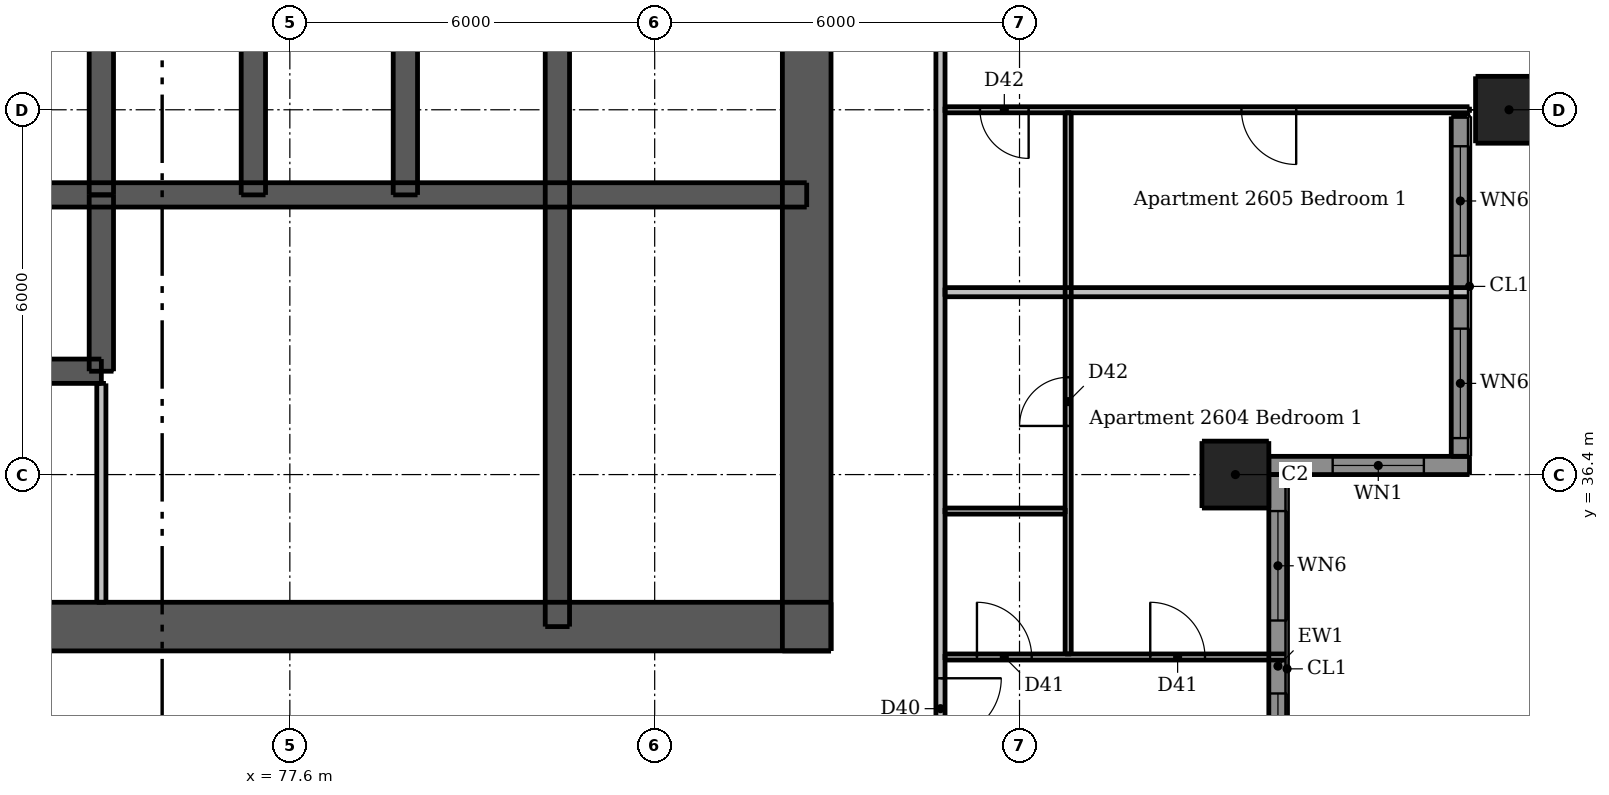
"""IFC4 building model, lengths in metres.
Left out: names, types, materials, properties, quantities, classifications, styles, units other than length and angle.
Written with IfcOpenShell. Run it as: python <this file> out.ifc"""

import sys

from ifc_helpers import new_model, si_unit, direction, frame, frame_2d, origin, origin_2d, place, context, subcontext, project, spatial, rectangle, extrude, element, fill, save


model = new_model("IFC4")
c1 = context("Model", 3, precision=1e-05, world=origin(), true_north=direction((0.0, 1.0)))
c2 = subcontext(c1, "Body", "Model", "MODEL_VIEW")
j1 = project(units=[si_unit("LENGTHUNIT", "METRE"), si_unit("PLANEANGLEUNIT", "RADIAN")], contexts=[c1])
p1 = place(None, origin())
s1 = spatial("IfcSite", under=j1, at=p1, CompositionType="ELEMENT")
p2 = place(p1, origin())
s2 = spatial("IfcBuilding", under=s1, at=p2, CompositionType="ELEMENT")
p3 = place(p2, frame((0.0, 0.0, 98.5)))
s3 = spatial("IfcBuildingStorey", under=s2, at=p3, CompositionType="ELEMENT", Elevation=98.5)
p4 = place(p3, frame((62.5, 33.9, 0.0), z_axis=(0.0, 0.0, 1.0), x_axis=(1.0, 0.0, 0.0)))
e1 = element("IfcWall", 1, at=p4, inside=s3, PredefinedType="SHEAR", context=c2, shape_type="SweptSolid", body=[
    extrude(rectangle(XDim=24.0, YDim=0.8, at=frame_2d((12.0, 0.0))), origin(), (0.0, 0.0, 1.0), 3.05),
])
p5 = place(p4, frame((2.0, 0.0, 0.0)))
e2 = element("IfcOpeningElement", 2, at=p5, cuts=e1, PredefinedType="OPENING", context=c2, shape_type="SweptSolid", body=[
    extrude(rectangle(XDim=1.1, YDim=2.1, at=frame_2d((0.55, 1.05))), frame((0.0, 0.41, 0.0), z_axis=(0.0, -1.0, 0.0), x_axis=(1.0, 0.0, 0.0)), (0.0, 0.0, 1.0), 0.82),
])
p6 = place(p4, frame((20.9, 0.0, 0.0)))
e3 = element("IfcOpeningElement", 3, at=p6, cuts=e1, PredefinedType="OPENING", context=c2, shape_type="SweptSolid", body=[
    extrude(rectangle(XDim=1.1, YDim=2.1, at=frame_2d((0.55, 1.05))), frame((0.0, 0.41, 0.0), z_axis=(0.0, -1.0, 0.0), x_axis=(1.0, 0.0, 0.0)), (0.0, 0.0, 1.0), 0.82),
])
p7 = place(p4, frame((8.0, 0.0, 0.0)))
e4 = element("IfcOpeningElement", 4, at=p7, cuts=e1, PredefinedType="OPENING", context=c2, shape_type="SweptSolid", body=[
    extrude(rectangle(XDim=1.1, YDim=2.1, at=frame_2d((0.55, 1.05))), frame((0.0, 0.41, 0.0), z_axis=(0.0, -1.0, 0.0), x_axis=(1.0, 0.0, 0.0)), (0.0, 0.0, 1.0), 0.82),
])
p8 = place(p4, frame((15.3, 0.0, 0.0)))
e5 = element("IfcOpeningElement", 5, at=p8, cuts=e1, PredefinedType="OPENING", context=c2, shape_type="SweptSolid", body=[
    extrude(rectangle(XDim=0.9, YDim=2.1, at=frame_2d((0.45, 1.05))), frame((0.0, 0.41, 0.0), z_axis=(0.0, -1.0, 0.0), x_axis=(1.0, 0.0, 0.0)), (0.0, 0.0, 1.0), 0.82),
])
p9 = place(p3, frame((86.1, 33.5, 0.0), z_axis=(0.0, 0.0, 1.0), x_axis=(0.0, 1.0, 0.0)))
e6 = element("IfcWall", 6, at=p9, inside=s3, PredefinedType="SHEAR", context=c2, shape_type="SweptSolid", body=[
    extrude(rectangle(XDim=24.0, YDim=0.8, at=frame_2d((12.0, 0.0))), origin(), (0.0, 0.0, 1.0), 3.05),
])
p10 = place(p9, frame((11.2, 0.0, 0.0)))
e7 = element("IfcOpeningElement", 7, at=p10, cuts=e6, PredefinedType="OPENING", context=c2, shape_type="SweptSolid", body=[
    extrude(rectangle(XDim=1.6, YDim=2.1, at=frame_2d((0.8, 1.05))), frame((0.0, 0.41, 0.0), z_axis=(0.0, -1.0, 0.0), x_axis=(1.0, 0.0, 0.0)), (0.0, 0.0, 1.0), 0.82),
])
p11 = place(p3, frame((62.9, 41.0, 0.0), z_axis=(0.0, 0.0, 1.0), x_axis=(1.0, 0.0, 0.0)))
e8 = element("IfcWall", 8, at=p11, inside=s3, PredefinedType="SHEAR", context=c2, shape_type="SweptSolid", body=[
    extrude(rectangle(XDim=23.2, YDim=0.4, at=frame_2d((11.6, 0.0))), origin(), (0.0, 0.0, 1.0), 3.05),
])
p12 = place(p3, frame((82.0, 33.9, 0.0), z_axis=(0.0, 0.0, 1.0), x_axis=(0.0, 1.0, 0.0)))
e9 = element("IfcWall", 9, at=p12, inside=s3, PredefinedType="SHEAR", context=c2, shape_type="SweptSolid", body=[
    extrude(rectangle(XDim=10.0, YDim=0.4, at=frame_2d((5.0, 0.0))), origin(), (0.0, 0.0, 1.0), 3.05),
])
for number, where, z_axis, x_axis in (
    (10, (74.5, 41.0, 0.0), (0.0, 0.0, 1.0), (0.0, 1.0, 0.0)),
    (11, (77.0, 41.0, 0.0), (0.0, 0.0, 1.0), (0.0, 1.0, 0.0)),
    (12, (79.5, 41.0, 0.0), (0.0, 0.0, 1.0), (0.0, 1.0, 0.0)),
):
    element("IfcWall", number, at=place(p3, frame(where, z_axis=z_axis, x_axis=x_axis)), inside=s3, PredefinedType="SHEAR", context=c2, shape_type="SweptSolid", body=[
        extrude(rectangle(XDim=2.9, YDim=0.4, at=frame_2d((1.45, 0.0))), origin(), (0.0, 0.0, 1.0), 3.05),
    ])
p13 = place(p3, frame((67.0, 38.1, 0.0), z_axis=(0.0, 0.0, 1.0), x_axis=(1.0, 0.0, 0.0)))
e13 = element("IfcWall", 13, at=p13, inside=s3, PredefinedType="SHEAR", context=c2, shape_type="SweptSolid", body=[
    extrude(rectangle(XDim=7.5, YDim=0.4, at=frame_2d((3.75, 0.0))), origin(), (0.0, 0.0, 1.0), 3.05),
])
p14 = place(p13, frame((0.7, 0.0, 0.0)))
e14 = element("IfcOpeningElement", 14, at=p14, cuts=e13, PredefinedType="OPENING", context=c2, shape_type="SweptSolid", body=[
    extrude(rectangle(XDim=1.1, YDim=2.1, at=frame_2d((0.55, 1.05))), frame((0.0, 0.21, 0.0), z_axis=(0.0, -1.0, 0.0), x_axis=(1.0, 0.0, 0.0)), (0.0, 0.0, 1.0), 0.42),
])
p15 = place(p13, frame((3.2, 0.0, 0.0)))
e15 = element("IfcOpeningElement", 15, at=p15, cuts=e13, PredefinedType="OPENING", context=c2, shape_type="SweptSolid", body=[
    extrude(rectangle(XDim=1.1, YDim=2.1, at=frame_2d((0.55, 1.05))), frame((0.0, 0.21, 0.0), z_axis=(0.0, -1.0, 0.0), x_axis=(1.0, 0.0, 0.0)), (0.0, 0.0, 1.0), 0.42),
])
p16 = place(p13, frame((5.65, 0.0, 0.0)))
e16 = element("IfcOpeningElement", 16, at=p16, cuts=e13, PredefinedType="OPENING", context=c2, shape_type="SweptSolid", body=[
    extrude(rectangle(XDim=1.2, YDim=2.1, at=frame_2d((0.6, 1.05))), frame((0.0, 0.21, 0.0), z_axis=(0.0, -1.0, 0.0), x_axis=(1.0, 0.0, 0.0)), (0.0, 0.0, 1.0), 0.42),
])
p17 = place(p3, frame((74.5, 38.1, 0.0), z_axis=(0.0, 0.0, 1.0), x_axis=(0.0, 1.0, 0.0)))
e17 = element("IfcWall", 17, at=p17, inside=s3, PredefinedType="SHEAR", context=c2, shape_type="SweptSolid", body=[
    extrude(rectangle(XDim=2.9, YDim=0.4, at=frame_2d((1.45, 0.0))), origin(), (0.0, 0.0, 1.0), 3.05),
])
for number, where, z_axis, x_axis in (
    (18, (93.15, 36.4, 0.0), (0.0, 0.0, 1.0), (1.0, 0.0, 0.0)),
    (19, (97.65, 42.4, 0.0), (0.0, 0.0, 1.0), (1.0, 0.0, 0.0)),
):
    element("IfcColumn", number, at=place(p3, frame(where, z_axis=z_axis, x_axis=x_axis)), inside=s3, PredefinedType="COLUMN", context=c2, shape_type="SweptSolid", body=[
        extrude(rectangle(XDim=1.1, YDim=1.1, at=origin_2d()), origin(), (0.0, 0.0, 1.0), 3.05),
    ])
p18 = place(p3, frame((93.7, 36.55, 0.0), z_axis=(0.0, 0.0, 1.0), x_axis=(1.0, 0.0, 0.0)))
e20 = element("IfcWall", 20, at=p18, inside=s3, PredefinedType="SOLIDWALL", context=c2, shape_type="SweptSolid", body=[
    extrude(rectangle(XDim=3.3, YDim=0.3, at=frame_2d((1.65, 0.0))), origin(), (0.0, 0.0, 1.0), 3.05),
])
p19 = place(p18, frame((1.05, 0.0, 0.9)))
e21 = element("IfcOpeningElement", 21, at=p19, cuts=e20, PredefinedType="OPENING", context=c2, shape_type="SweptSolid", body=[
    extrude(rectangle(XDim=1.5, YDim=1.5, at=frame_2d((0.75, 0.75))), frame((0.0, 0.16, 0.0), z_axis=(0.0, -1.0, 0.0), x_axis=(1.0, 0.0, 0.0)), (0.0, 0.0, 1.0), 0.32),
])
p20 = place(p3, frame((93.85, 30.1, 0.0), z_axis=(0.0, 0.0, 1.0), x_axis=(0.0, 1.0, 0.0)))
e22 = element("IfcWall", 22, at=p20, inside=s3, PredefinedType="SOLIDWALL", context=c2, shape_type="SweptSolid", body=[
    extrude(rectangle(XDim=6.3, YDim=0.3, at=frame_2d((3.15, 0.0))), origin(), (0.0, 0.0, 1.0), 3.05),
])
p21 = place(p20, frame((0.9, 0.0, 0.15)))
e23 = element("IfcOpeningElement", 23, at=p21, cuts=e22, PredefinedType="OPENING", context=c2, shape_type="SweptSolid", body=[
    extrude(rectangle(XDim=1.8, YDim=2.1, at=frame_2d((0.9, 1.05))), frame((0.0, 0.16, 0.0), z_axis=(0.0, -1.0, 0.0), x_axis=(1.0, 0.0, 0.0)), (0.0, 0.0, 1.0), 0.32),
])
p22 = place(p20, frame((3.9, 0.0, 0.15)))
e24 = element("IfcOpeningElement", 24, at=p22, cuts=e22, PredefinedType="OPENING", context=c2, shape_type="SweptSolid", body=[
    extrude(rectangle(XDim=1.8, YDim=2.1, at=frame_2d((0.9, 1.05))), frame((0.0, 0.16, 0.0), z_axis=(0.0, -1.0, 0.0), x_axis=(1.0, 0.0, 0.0)), (0.0, 0.0, 1.0), 0.32),
])
p23 = place(p3, frame((96.85, 36.7, 0.0), z_axis=(0.0, 0.0, 1.0), x_axis=(0.0, 1.0, 0.0)))
e25 = element("IfcWall", 25, at=p23, inside=s3, PredefinedType="SOLIDWALL", context=c2, shape_type="SweptSolid", body=[
    extrude(rectangle(XDim=5.59, YDim=0.3, at=frame_2d((2.795, 0.0))), origin(), (0.0, 0.0, 1.0), 3.05),
])
p24 = place(p23, frame((0.3, 0.0, 0.15)))
e26 = element("IfcOpeningElement", 26, at=p24, cuts=e25, PredefinedType="OPENING", context=c2, shape_type="SweptSolid", body=[
    extrude(rectangle(XDim=1.8, YDim=2.1, at=frame_2d((0.9, 1.05))), frame((0.0, 0.16, 0.0), z_axis=(0.0, -1.0, 0.0), x_axis=(1.0, 0.0, 0.0)), (0.0, 0.0, 1.0), 0.32),
])
p25 = place(p23, frame((3.3, 0.0, 0.15)))
e27 = element("IfcOpeningElement", 27, at=p25, cuts=e25, PredefinedType="OPENING", context=c2, shape_type="SweptSolid", body=[
    extrude(rectangle(XDim=1.8, YDim=2.1, at=frame_2d((0.9, 1.05))), frame((0.0, 0.16, 0.0), z_axis=(0.0, -1.0, 0.0), x_axis=(1.0, 0.0, 0.0)), (0.0, 0.0, 1.0), 0.32),
])
p26 = place(p3, frame((74.5, 34.3, 0.0), z_axis=(0.0, 0.0, 1.0), x_axis=(0.0, 1.0, 0.0)))
e28 = element("IfcWall", 28, at=p26, inside=s3, PredefinedType="PLUMBINGWALL", context=c2, shape_type="SweptSolid", body=[
    extrude(rectangle(XDim=3.6, YDim=0.15, at=frame_2d((1.8, 0.0))), origin(), (0.0, 0.0, 1.0), 3.05),
])
p27 = place(p3, frame((90.4, 33.45, 0.0), z_axis=(0.0, 0.0, 1.0), x_axis=(0.0, 1.0, 0.0)))
e29 = element("IfcWall", 29, at=p27, inside=s3, PredefinedType="PARTITIONING", context=c2, shape_type="SweptSolid", body=[
    extrude(rectangle(XDim=8.9, YDim=0.1, at=frame_2d((4.45, 0.0))), origin(), (0.0, 0.0, 1.0), 3.05),
])
p28 = place(p27, frame((3.75, 0.0, 0.0)))
e30 = element("IfcOpeningElement", 30, at=p28, cuts=e29, PredefinedType="OPENING", context=c2, shape_type="SweptSolid", body=[
    extrude(rectangle(XDim=0.8, YDim=2.1, at=frame_2d((0.4, 1.05))), frame((0.0, 0.06, 0.0), z_axis=(0.0, -1.0, 0.0), x_axis=(1.0, 0.0, 0.0)), (0.0, 0.0, 1.0), 0.12),
])
p29 = place(p3, frame((97.0, 42.4, 0.0), z_axis=(0.0, 0.0, 1.0), x_axis=(-1.0, 0.0, 0.0)))
e31 = element("IfcWall", 31, at=p29, inside=s3, PredefinedType="PARTITIONING", context=c2, shape_type="SweptSolid", body=[
    extrude(rectangle(XDim=8.625, YDim=0.1, at=frame_2d((4.312, 0.0))), origin(), (0.0, 0.0, 1.0), 2.516),
])
p30 = place(p29, frame((2.85, 0.0, 0.0)))
e32 = element("IfcOpeningElement", 32, at=p30, cuts=e31, PredefinedType="OPENING", context=c2, shape_type="SweptSolid", body=[
    extrude(rectangle(XDim=0.9, YDim=2.1, at=frame_2d((0.45, 1.05))), frame((0.0, 0.06, 0.0), z_axis=(0.0, -1.0, 0.0), x_axis=(1.0, 0.0, 0.0)), (0.0, 0.0, 1.0), 0.12),
])
p31 = place(p29, frame((7.25, 0.0, 0.0)))
e33 = element("IfcOpeningElement", 33, at=p31, cuts=e31, PredefinedType="OPENING", context=c2, shape_type="SweptSolid", body=[
    extrude(rectangle(XDim=0.8, YDim=2.1, at=frame_2d((0.4, 1.05))), frame((0.0, 0.06, 0.0), z_axis=(0.0, -1.0, 0.0), x_axis=(1.0, 0.0, 0.0)), (0.0, 0.0, 1.0), 0.12),
])
p32 = place(p3, frame((88.375, 35.8, 0.0), z_axis=(0.0, 0.0, 1.0), x_axis=(1.0, 0.0, 0.0)))
e34 = element("IfcWall", 34, at=p32, inside=s3, PredefinedType="PARTITIONING", context=c2, shape_type="SweptSolid", body=[
    extrude(rectangle(XDim=1.975, YDim=0.1, at=frame_2d((0.988, 0.0))), origin(), (0.0, 0.0, 1.0), 3.05),
])
p33 = place(p3, frame((88.375, 33.4, 0.0), z_axis=(0.0, 0.0, 1.0), x_axis=(1.0, 0.0, 0.0)))
e35 = element("IfcWall", 35, at=p33, inside=s3, PredefinedType="PARTITIONING", context=c2, shape_type="SweptSolid", body=[
    extrude(rectangle(XDim=5.625, YDim=0.1, at=frame_2d((2.812, 0.0))), origin(), (0.0, 0.0, 1.0), 3.05),
])
p34 = place(p33, frame((0.525, 0.0, 0.0)))
e36 = element("IfcOpeningElement", 36, at=p34, cuts=e35, PredefinedType="OPENING", context=c2, shape_type="SweptSolid", body=[
    extrude(rectangle(XDim=0.9, YDim=2.1, at=frame_2d((0.45, 1.05))), frame((0.0, 0.06, 0.0), z_axis=(0.0, -1.0, 0.0), x_axis=(1.0, 0.0, 0.0)), (0.0, 0.0, 1.0), 0.12),
])
p35 = place(p33, frame((3.375, 0.0, 0.0)))
e37 = element("IfcOpeningElement", 37, at=p35, cuts=e35, PredefinedType="OPENING", context=c2, shape_type="SweptSolid", body=[
    extrude(rectangle(XDim=0.9, YDim=2.1, at=frame_2d((0.45, 1.05))), frame((0.0, 0.06, 0.0), z_axis=(0.0, -1.0, 0.0), x_axis=(1.0, 0.0, 0.0)), (0.0, 0.0, 1.0), 0.12),
])
p36 = place(p3, frame((88.3, 60.475, 0.0), z_axis=(0.0, 0.0, 1.0), x_axis=(0.0, -1.0, 0.0)))
e38 = element("IfcWall", 38, at=p36, inside=s3, PredefinedType="PARTITIONING", context=c2, shape_type="SweptSolid", body=[
    extrude(rectangle(XDim=28.7, YDim=0.15, at=frame_2d((14.35, 0.0))), origin(), (0.0, 0.0, 1.0), 3.05),
])
p37 = place(p36, frame((27.425, 0.0, 0.0)))
e39 = element("IfcOpeningElement", 39, at=p37, cuts=e38, PredefinedType="OPENING", context=c2, shape_type="SweptSolid", body=[
    extrude(rectangle(XDim=1.0, YDim=2.1, at=frame_2d((0.5, 1.05))), frame((0.0, 0.085, 0.0), z_axis=(0.0, -1.0, 0.0), x_axis=(1.0, 0.0, 0.0)), (0.0, 0.0, 1.0), 0.17),
])
p38 = place(p36, frame((14.575, 0.0, 0.0)))
e40 = element("IfcOpeningElement", 40, at=p38, cuts=e38, PredefinedType="OPENING", context=c2, shape_type="SweptSolid", body=[
    extrude(rectangle(XDim=1.0, YDim=2.1, at=frame_2d((0.5, 1.05))), frame((0.0, 0.085, 0.0), z_axis=(0.0, -1.0, 0.0), x_axis=(1.0, 0.0, 0.0)), (0.0, 0.0, 1.0), 0.17),
])
p39 = place(p36, frame((3.775, 0.0, 0.0)))
e41 = element("IfcOpeningElement", 41, at=p39, cuts=e38, PredefinedType="OPENING", context=c2, shape_type="SweptSolid", body=[
    extrude(rectangle(XDim=1.0, YDim=2.1, at=frame_2d((0.5, 1.05))), frame((0.0, 0.085, 0.0), z_axis=(0.0, -1.0, 0.0), x_axis=(1.0, 0.0, 0.0)), (0.0, 0.0, 1.0), 0.17),
])
p40 = place(p3, frame((88.375, 39.4, 0.0), z_axis=(0.0, 0.0, 1.0), x_axis=(1.0, 0.0, 0.0)))
e42 = element("IfcWall", 42, at=p40, inside=s3, PredefinedType="PARTITIONING", context=c2, shape_type="SweptSolid", body=[
    extrude(rectangle(XDim=8.625, YDim=0.15, at=frame_2d((4.312, 0.0))), origin(), (0.0, 0.0, 1.0), 3.05),
])
p41 = place(p19, origin())
e43 = element("IfcWindow", 43, at=p41, inside=s3, PartitioningType="DOUBLE_PANEL_VERTICAL", PredefinedType="WINDOW", context=c2, shape_type="SweptSolid", body=[
    extrude(rectangle(XDim=1.5, YDim=1.5, at=frame_2d((0.75, 0.75))), frame((0.0, 0.03, 0.0), z_axis=(0.0, -1.0, 0.0), x_axis=(1.0, 0.0, 0.0)), (0.0, 0.0, 1.0), 0.06),
])
fill(e21, e43)
p42 = place(p21, origin())
e44 = element("IfcWindow", 44, at=p42, inside=s3, PartitioningType="DOUBLE_PANEL_VERTICAL", PredefinedType="WINDOW", context=c2, shape_type="SweptSolid", body=[
    extrude(rectangle(XDim=1.8, YDim=2.1, at=frame_2d((0.9, 1.05))), frame((0.0, 0.03, 0.0), z_axis=(0.0, -1.0, 0.0), x_axis=(1.0, 0.0, 0.0)), (0.0, 0.0, 1.0), 0.06),
])
fill(e23, e44)
p43 = place(p22, origin())
e45 = element("IfcWindow", 45, at=p43, inside=s3, PartitioningType="DOUBLE_PANEL_VERTICAL", PredefinedType="WINDOW", context=c2, shape_type="SweptSolid", body=[
    extrude(rectangle(XDim=1.8, YDim=2.1, at=frame_2d((0.9, 1.05))), frame((0.0, 0.03, 0.0), z_axis=(0.0, -1.0, 0.0), x_axis=(1.0, 0.0, 0.0)), (0.0, 0.0, 1.0), 0.06),
])
fill(e24, e45)
p44 = place(p24, origin())
e46 = element("IfcWindow", 46, at=p44, inside=s3, PartitioningType="DOUBLE_PANEL_VERTICAL", PredefinedType="WINDOW", context=c2, shape_type="SweptSolid", body=[
    extrude(rectangle(XDim=1.8, YDim=2.1, at=frame_2d((0.9, 1.05))), frame((0.0, 0.03, 0.0), z_axis=(0.0, -1.0, 0.0), x_axis=(1.0, 0.0, 0.0)), (0.0, 0.0, 1.0), 0.06),
])
fill(e26, e46)
p45 = place(p25, origin())
e47 = element("IfcWindow", 47, at=p45, inside=s3, PartitioningType="DOUBLE_PANEL_VERTICAL", PredefinedType="WINDOW", context=c2, shape_type="SweptSolid", body=[
    extrude(rectangle(XDim=1.8, YDim=2.1, at=frame_2d((0.9, 1.05))), frame((0.0, 0.03, 0.0), z_axis=(0.0, -1.0, 0.0), x_axis=(1.0, 0.0, 0.0)), (0.0, 0.0, 1.0), 0.06),
])
fill(e27, e47)
p46 = place(p6, origin())
e48 = element("IfcDoor", 48, at=p46, inside=s3, OperationType="SINGLE_SWING_RIGHT", PredefinedType="DOOR", context=c2, shape_type="SweptSolid", body=[
    extrude(rectangle(XDim=1.1, YDim=2.1, at=frame_2d((0.55, 1.05))), frame((0.0, 0.388, 0.0), z_axis=(0.0, -1.0, 0.0), x_axis=(1.0, 0.0, 0.0)), (0.0, 0.0, 1.0), 0.05),
])
fill(e3, e48)
p47 = place(p8, origin())
e49 = element("IfcDoor", 49, at=p47, inside=s3, OperationType="SINGLE_SWING_LEFT", PredefinedType="DOOR", context=c2, shape_type="SweptSolid", body=[
    extrude(rectangle(XDim=0.9, YDim=2.1, at=frame_2d((0.45, 1.05))), frame((0.0, 0.388, 0.0), z_axis=(0.0, -1.0, 0.0), x_axis=(1.0, 0.0, 0.0)), (0.0, 0.0, 1.0), 0.05),
])
fill(e5, e49)
p48 = place(p16, origin())
e50 = element("IfcDoor", 50, at=p48, inside=s3, OperationType="DOUBLE_DOOR_SLIDING", PredefinedType="DOOR", context=c2, shape_type="SweptSolid", body=[
    extrude(rectangle(XDim=1.2, YDim=2.1, at=frame_2d((0.6, 1.05))), frame((0.0, 0.025, 0.0), z_axis=(0.0, -1.0, 0.0), x_axis=(1.0, 0.0, 0.0)), (0.0, 0.0, 1.0), 0.05),
])
fill(e16, e50)
p49 = place(p37, origin())
e51 = element("IfcDoor", 51, at=p49, inside=s3, OperationType="SINGLE_SWING_LEFT", PredefinedType="DOOR", context=c2, shape_type="SweptSolid", body=[
    extrude(rectangle(XDim=1.0, YDim=2.1, at=frame_2d((0.5, 1.05))), frame((0.0, 0.025, 0.0), z_axis=(0.0, -1.0, 0.0), x_axis=(1.0, 0.0, 0.0)), (0.0, 0.0, 1.0), 0.05),
])
fill(e39, e51)
p50 = place(p34, origin())
e52 = element("IfcDoor", 52, at=p50, inside=s3, OperationType="SINGLE_SWING_LEFT", PredefinedType="DOOR", context=c2, shape_type="SweptSolid", body=[
    extrude(rectangle(XDim=0.9, YDim=2.1, at=frame_2d((0.45, 1.05))), frame((0.0, 0.025, 0.0), z_axis=(0.0, -1.0, 0.0), x_axis=(1.0, 0.0, 0.0)), (0.0, 0.0, 1.0), 0.05),
])
fill(e36, e52)
p51 = place(p35, origin())
e53 = element("IfcDoor", 53, at=p51, inside=s3, OperationType="SINGLE_SWING_LEFT", PredefinedType="DOOR", context=c2, shape_type="SweptSolid", body=[
    extrude(rectangle(XDim=0.9, YDim=2.1, at=frame_2d((0.45, 1.05))), frame((0.0, 0.025, 0.0), z_axis=(0.0, -1.0, 0.0), x_axis=(1.0, 0.0, 0.0)), (0.0, 0.0, 1.0), 0.05),
])
fill(e37, e53)
p52 = place(p28, origin())
e54 = element("IfcDoor", 54, at=p52, inside=s3, OperationType="SINGLE_SWING_LEFT", PredefinedType="DOOR", context=c2, shape_type="SweptSolid", body=[
    extrude(rectangle(XDim=0.8, YDim=2.1, at=frame_2d((0.4, 1.05))), frame((0.0, 0.025, 0.0), z_axis=(0.0, -1.0, 0.0), x_axis=(1.0, 0.0, 0.0)), (0.0, 0.0, 1.0), 0.05),
])
fill(e30, e54)
p53 = place(p30, origin())
e55 = element("IfcDoor", 55, at=p53, inside=s3, OperationType="SINGLE_SWING_LEFT", PredefinedType="DOOR", context=c2, shape_type="SweptSolid", body=[
    extrude(rectangle(XDim=0.9, YDim=2.1, at=frame_2d((0.45, 1.05))), frame((0.0, 0.025, 0.0), z_axis=(0.0, -1.0, 0.0), x_axis=(1.0, 0.0, 0.0)), (0.0, 0.0, 1.0), 0.05),
])
fill(e32, e55)
p54 = place(p31, origin())
e56 = element("IfcDoor", 56, at=p54, inside=s3, OperationType="SINGLE_SWING_LEFT", PredefinedType="DOOR", context=c2, shape_type="SweptSolid", body=[
    extrude(rectangle(XDim=0.8, YDim=2.1, at=frame_2d((0.4, 1.05))), frame((0.0, 0.025, 0.0), z_axis=(0.0, -1.0, 0.0), x_axis=(1.0, 0.0, 0.0)), (0.0, 0.0, 1.0), 0.05),
])
fill(e33, e56)
save(model, sys.argv[1])
